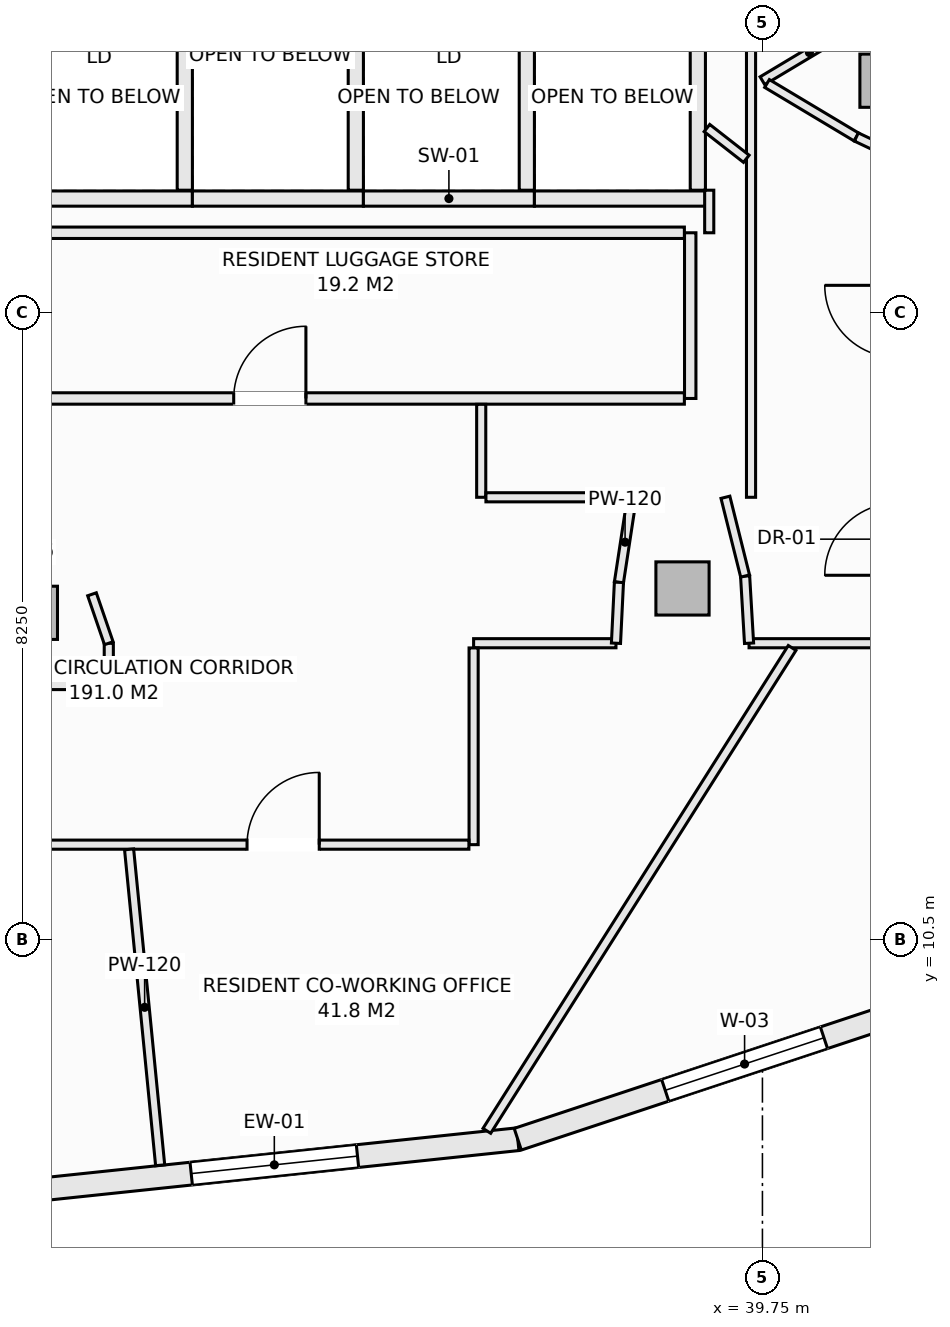
"""IFC4 building model, lengths in metres.
Left out: names, types, materials, properties, quantities, classifications, styles, units other than length and angle.
Written with IfcOpenShell. Run it as: python <this file> out.ifc"""

import sys

from ifc_helpers import new_model, si_unit, direction, frame, frame_2d, origin, origin_2d, place, context, subcontext, project, spatial, rectangle, extrude, element, fill, save


model = new_model("IFC4")
c1 = context("Model", 3, precision=1e-05, world=origin(), true_north=direction((0.0, 1.0)))
c2 = subcontext(c1, "Body", "Model", "MODEL_VIEW")
j1 = project(units=[si_unit("LENGTHUNIT", "METRE"), si_unit("PLANEANGLEUNIT", "RADIAN")], contexts=[c1])
p1 = place(None, origin())
s1 = spatial("IfcSite", under=j1, at=p1, CompositionType="ELEMENT")
p2 = place(p1, origin())
s2 = spatial("IfcBuilding", under=s1, at=p2, CompositionType="ELEMENT")
p3 = place(p2, frame((0.0, 0.0, 206.3)))
s3 = spatial("IfcBuildingStorey", under=s2, at=p3, CompositionType="ELEMENT", Elevation=206.3)
for number, where, z_axis, x_axis in (
    (1, (30.125, 14.8, -0.27), (0.0, 0.0, 1.0), (1.0, 0.0, 0.0)),
    (2, (38.698, 15.121, -0.27), (0.0, 0.0, 1.0), (1.0, 0.0, 0.0)),
    (3, (41.382, 21.801, -0.27), (0.0, 0.0, 1.0), (1.0, 0.0, 0.0)),
):
    element("IfcColumn", number, at=place(p3, frame(where, z_axis=z_axis, x_axis=x_axis)), inside=s3, PredefinedType="COLUMN", context=c2, shape_type="SweptSolid", body=[
        extrude(rectangle(XDim=0.7, YDim=0.7, at=origin_2d()), origin(), (0.0, 0.0, 1.0), 3.3),
    ])
p4 = place(p3, frame((30.125, 7.2, 0.0), z_axis=(0.0, 0.0, 1.0), x_axis=(0.994497142298, 0.104763705363, 0.0)))
e4 = element("IfcWall", 4, at=p4, inside=s3, PredefinedType="SOLIDWALL", context=c2, shape_type="SweptSolid", body=[
    extrude(rectangle(XDim=6.441, YDim=0.3, at=frame_2d((3.221, 0.0))), origin(), (0.0, 0.0, 1.0), 2.605),
])
p5 = place(p4, frame((2.121, 0.0, 0.72)))
e5 = element("IfcOpeningElement", 5, at=p5, cuts=e4, PredefinedType="OPENING", context=c2, shape_type="SweptSolid", body=[
    extrude(rectangle(XDim=2.2, YDim=1.65, at=frame_2d((1.1, 0.825))), frame((0.0, 0.16, 0.0), z_axis=(0.0, -1.0, 0.0), x_axis=(1.0, 0.0, 0.0)), (0.0, 0.0, 1.0), 0.32),
])
p6 = place(p3, frame((36.531, 7.875, 0.0), z_axis=(0.0, 0.0, 1.0), x_axis=(0.949240877604, 0.314550085495, 0.0)))
e6 = element("IfcWall", 6, at=p6, inside=s3, PredefinedType="SOLIDWALL", context=c2, shape_type="SweptSolid", body=[
    extrude(rectangle(XDim=6.288, YDim=0.3, at=frame_2d((3.144, 0.0))), origin(), (0.0, 0.0, 1.0), 2.605),
])
p7 = place(p6, frame((2.044, 0.0, 0.72)))
e7 = element("IfcOpeningElement", 7, at=p7, cuts=e6, PredefinedType="OPENING", context=c2, shape_type="SweptSolid", body=[
    extrude(rectangle(XDim=2.2, YDim=1.65, at=frame_2d((1.1, 0.825))), frame((0.0, 0.16, 0.0), z_axis=(0.0, -1.0, 0.0), x_axis=(1.0, 0.0, 0.0)), (0.0, 0.0, 1.0), 0.32),
])
p8 = place(p3, frame((29.8, 20.25, 0.0), z_axis=(0.0, 0.0, 1.0), x_axis=(1.0, 0.0, 0.0)))
e8 = element("IfcWall", 8, at=p8, inside=s3, PredefinedType="SOLIDWALL", context=c2, shape_type="SweptSolid", body=[
    extrude(rectangle(XDim=2.45, YDim=0.2, at=frame_2d((1.225, 0.0))), origin(), (0.0, 0.0, 1.0), 3.03),
])
p9 = place(p3, frame((32.15, 20.36, 0.0), z_axis=(0.0, 0.0, 1.0), x_axis=(0.0, 1.0, 0.0)))
e9 = element("IfcWall", 9, at=p9, inside=s3, PredefinedType="SOLIDWALL", context=c2, shape_type="SweptSolid", body=[
    extrude(rectangle(XDim=2.43, YDim=0.2, at=frame_2d((1.215, 0.0))), origin(), (0.0, 0.0, 1.0), 3.03),
])
p10 = place(p3, frame((32.25, 20.25, 0.0), z_axis=(0.0, 0.0, 1.0), x_axis=(1.0, 0.0, 0.0)))
e10 = element("IfcWall", 10, at=p10, inside=s3, PredefinedType="SOLIDWALL", context=c2, shape_type="SweptSolid", body=[
    extrude(rectangle(XDim=2.25, YDim=0.2, at=frame_2d((1.125, 0.0))), origin(), (0.0, 0.0, 1.0), 3.03),
])
p11 = place(p3, frame((34.4, 20.36, 0.0), z_axis=(0.0, 0.0, 1.0), x_axis=(0.0, 1.0, 0.0)))
e11 = element("IfcWall", 11, at=p11, inside=s3, PredefinedType="SOLIDWALL", context=c2, shape_type="SweptSolid", body=[
    extrude(rectangle(XDim=2.43, YDim=0.2, at=frame_2d((1.215, 0.0))), origin(), (0.0, 0.0, 1.0), 3.03),
])
p12 = place(p3, frame((34.5, 20.25, 0.0), z_axis=(0.0, 0.0, 1.0), x_axis=(1.0, 0.0, 0.0)))
e12 = element("IfcWall", 12, at=p12, inside=s3, PredefinedType="SOLIDWALL", context=c2, shape_type="SweptSolid", body=[
    extrude(rectangle(XDim=2.25, YDim=0.2, at=frame_2d((1.125, 0.0))), origin(), (0.0, 0.0, 1.0), 3.03),
])
p13 = place(p3, frame((36.65, 20.36, 0.0), z_axis=(0.0, 0.0, 1.0), x_axis=(0.0, 1.0, 0.0)))
e13 = element("IfcWall", 13, at=p13, inside=s3, PredefinedType="SOLIDWALL", context=c2, shape_type="SweptSolid", body=[
    extrude(rectangle(XDim=2.43, YDim=0.2, at=frame_2d((1.215, 0.0))), origin(), (0.0, 0.0, 1.0), 3.03),
])
p14 = place(p3, frame((36.75, 20.25, 0.0), z_axis=(0.0, 0.0, 1.0), x_axis=(1.0, 0.0, 0.0)))
e14 = element("IfcWall", 14, at=p14, inside=s3, PredefinedType="SOLIDWALL", context=c2, shape_type="SweptSolid", body=[
    extrude(rectangle(XDim=2.25, YDim=0.2, at=frame_2d((1.125, 0.0))), origin(), (0.0, 0.0, 1.0), 3.03),
])
p15 = place(p3, frame((38.9, 20.36, 0.0), z_axis=(0.0, 0.0, 1.0), x_axis=(0.0, 1.0, 0.0)))
e15 = element("IfcWall", 15, at=p15, inside=s3, PredefinedType="SOLIDWALL", context=c2, shape_type="SweptSolid", body=[
    extrude(rectangle(XDim=2.43, YDim=0.2, at=frame_2d((1.215, 0.0))), origin(), (0.0, 0.0, 1.0), 3.03),
])
p16 = place(p3, frame((38.8, 17.62, 0.0), z_axis=(0.0, 0.0, 1.0), x_axis=(0.0, 1.0, 0.0)))
e16 = element("IfcWall", 16, at=p16, inside=s3, PredefinedType="PARTITIONING", context=c2, shape_type="SweptSolid", body=[
    extrude(rectangle(XDim=2.18, YDim=0.15, at=frame_2d((1.09, 0.0))), origin(), (0.0, 0.0, 1.0), 3.03),
])
p17 = place(p3, frame((30.077, 17.62, 0.0), z_axis=(0.0, 0.0, 1.0), x_axis=(1.0, 0.0, 0.0)))
e17 = element("IfcWall", 17, at=p17, inside=s3, PredefinedType="PARTITIONING", context=c2, shape_type="SweptSolid", body=[
    extrude(rectangle(XDim=8.646, YDim=0.15, at=frame_2d((4.323, 0.0))), origin(), (0.0, 0.0, 1.0), 3.03),
])
p18 = place(p17, frame((2.717, 0.0, 0.0)))
e18 = element("IfcOpeningElement", 18, at=p18, cuts=e17, PredefinedType="OPENING", context=c2, shape_type="SweptSolid", body=[
    extrude(rectangle(XDim=0.95, YDim=2.1, at=frame_2d((0.475, 1.05))), frame((0.0, 0.085, 0.0), z_axis=(0.0, -1.0, 0.0), x_axis=(1.0, 0.0, 0.0)), (0.0, 0.0, 1.0), 0.17),
])
p19 = place(p3, frame((30.077, 19.8, 0.0), z_axis=(0.0, 0.0, 1.0), x_axis=(1.0, 0.0, 0.0)))
e19 = element("IfcWall", 19, at=p19, inside=s3, PredefinedType="PARTITIONING", context=c2, shape_type="SweptSolid", body=[
    extrude(rectangle(XDim=8.646, YDim=0.15, at=frame_2d((4.323, 0.0))), origin(), (0.0, 0.0, 1.0), 3.03),
])
p20 = place(p3, frame((39.05, 19.8, 0.0), z_axis=(0.0, 0.0, 1.0), x_axis=(0.0, 1.0, 0.0)))
e20 = element("IfcWall", 20, at=p20, inside=s3, PredefinedType="PARTITIONING", context=c2, shape_type="SweptSolid", body=[
    extrude(rectangle(XDim=0.56, YDim=0.12, at=frame_2d((0.28, 0.0))), origin(), (0.0, 0.0, 1.0), 3.03),
])
p21 = place(p3, frame((39.6, 16.32, 0.0), z_axis=(0.0, 0.0, 1.0), x_axis=(0.0, 1.0, 0.0)))
e21 = element("IfcWall", 21, at=p21, inside=s3, PredefinedType="PARTITIONING", context=c2, shape_type="SweptSolid", body=[
    extrude(rectangle(XDim=6.7, YDim=0.12, at=frame_2d((3.35, 0.0))), origin(), (0.0, 0.0, 1.0), 2.478),
])
p22 = place(p3, frame((39.75, 21.8, 0.0), z_axis=(0.0, 0.0, 1.0), x_axis=(0.857702120906, 0.514146935996, 0.0)))
e22 = element("IfcWall", 22, at=p22, inside=s3, PredefinedType="PARTITIONING", context=c2, shape_type="SweptSolid", body=[
    extrude(rectangle(XDim=1.441, YDim=0.12, at=frame_2d((0.721, 0.0))), origin(), (0.0, 0.0, 1.0), 3.03),
])
p23 = place(p3, frame((39.81, 21.764, 0.0), z_axis=(0.0, 0.0, 1.0), x_axis=(0.858011245414, -0.513630901273, 0.0)))
e23 = element("IfcWall", 23, at=p23, inside=s3, PredefinedType="PARTITIONING", context=c2, shape_type="SweptSolid", body=[
    extrude(rectangle(XDim=1.37, YDim=0.12, at=frame_2d((0.685, 0.0))), origin(), (0.0, 0.0, 1.0), 3.03),
])
p24 = place(p3, frame((40.986, 21.06, 0.0), z_axis=(0.0, 0.0, 1.0), x_axis=(0.90356951601, -0.428441512621, 0.0)))
e24 = element("IfcWall", 24, at=p24, inside=s3, PredefinedType="PARTITIONING", context=c2, shape_type="SweptSolid", body=[
    extrude(rectangle(XDim=0.591, YDim=0.12, at=frame_2d((0.295, 0.0))), origin(), (0.0, 0.0, 1.0), 3.03),
])
p25 = place(p3, frame((35.95, 14.4, 0.0), z_axis=(0.0, 0.0, 1.0), x_axis=(1.0, 0.0, 0.0)))
e25 = element("IfcWall", 25, at=p25, inside=s3, PredefinedType="PARTITIONING", context=c2, shape_type="SweptSolid", body=[
    extrude(rectangle(XDim=1.873, YDim=0.12, at=frame_2d((0.937, 0.0))), origin(), (0.0, 0.0, 1.0), 3.03),
])
p26 = place(p3, frame((39.574, 14.4, 0.0), z_axis=(0.0, 0.0, 1.0), x_axis=(1.0, 0.0, 0.0)))
e26 = element("IfcWall", 26, at=p26, inside=s3, PredefinedType="PARTITIONING", context=c2, shape_type="SweptSolid", body=[
    extrude(rectangle(XDim=1.884, YDim=0.12, at=frame_2d((0.942, 0.0))), origin(), (0.0, 0.0, 1.0), 3.03),
])
p27 = place(p3, frame((39.522, 15.284, 0.0), z_axis=(0.0, 0.0, 1.0), x_axis=(0.058722021951, -0.998274373175, 0.0)))
e27 = element("IfcWall", 27, at=p27, inside=s3, PredefinedType="PARTITIONING", context=c2, shape_type="SweptSolid", body=[
    extrude(rectangle(XDim=0.885, YDim=0.12, at=frame_2d((0.443, 0.0))), origin(), (0.0, 0.0, 1.0), 3.03),
])
p28 = place(p3, frame((39.263, 16.32, 0.0), z_axis=(0.0, 0.0, 1.0), x_axis=(0.242535625036, -0.970142500145, 0.0)))
e28 = element("IfcWall", 28, at=p28, inside=s3, PredefinedType="PARTITIONING", context=c2, shape_type="SweptSolid", body=[
    extrude(rectangle(XDim=1.068, YDim=0.12, at=frame_2d((0.534, 0.0))), origin(), (0.0, 0.0, 1.0), 2.478),
])
p29 = place(p3, frame((36.05, 16.32, 0.0), z_axis=(0.0, 0.0, 1.0), x_axis=(0.0, 1.0, 0.0)))
e29 = element("IfcWall", 29, at=p29, inside=s3, PredefinedType="PARTITIONING", context=c2, shape_type="SweptSolid", body=[
    extrude(rectangle(XDim=1.223, YDim=0.12, at=frame_2d((0.611, 0.0))), origin(), (0.0, 0.0, 1.0), 3.03),
])
p30 = place(p3, frame((36.112, 16.32, 0.0), z_axis=(0.0, 0.0, 1.0), x_axis=(1.0, 0.0, 0.0)))
e30 = element("IfcWall", 30, at=p30, inside=s3, PredefinedType="PARTITIONING", context=c2, shape_type="SweptSolid", body=[
    extrude(rectangle(XDim=1.921, YDim=0.12, at=frame_2d((0.96, 0.0))), origin(), (0.0, 0.0, 1.0), 3.03),
])
p31 = place(p3, frame((37.862, 15.201, 0.0), z_axis=(0.0, 0.0, 1.0), x_axis=(0.150907653202, 0.988547864398, 0.0)))
e31 = element("IfcWall", 31, at=p31, inside=s3, PredefinedType="PARTITIONING", context=c2, shape_type="SweptSolid", body=[
    extrude(rectangle(XDim=1.069, YDim=0.12, at=frame_2d((0.535, 0.0))), origin(), (0.0, 0.0, 1.0), 3.03),
])
p32 = place(p3, frame((37.823, 14.4, 0.0), z_axis=(0.0, 0.0, 1.0), x_axis=(0.04870773904, 0.998813073682, 0.0)))
e32 = element("IfcWall", 32, at=p32, inside=s3, PredefinedType="PARTITIONING", context=c2, shape_type="SweptSolid", body=[
    extrude(rectangle(XDim=0.802, YDim=0.12, at=frame_2d((0.401, 0.0))), origin(), (0.0, 0.0, 1.0), 3.03),
])
p33 = place(p3, frame((35.95, 11.75, 0.0), z_axis=(0.0, 0.0, 1.0), x_axis=(0.0, 1.0, 0.0)))
e33 = element("IfcWall", 33, at=p33, inside=s3, PredefinedType="PARTITIONING", context=c2, shape_type="SweptSolid", body=[
    extrude(rectangle(XDim=2.588, YDim=0.12, at=frame_2d((1.294, 0.0))), origin(), (0.0, 0.0, 1.0), 3.03),
])
p34 = place(p3, frame((27.212, 11.75, 0.0), z_axis=(0.0, 0.0, 1.0), x_axis=(1.0, 0.0, 0.0)))
e34 = element("IfcWall", 34, at=p34, inside=s3, PredefinedType="PARTITIONING", context=c2, shape_type="SweptSolid", body=[
    extrude(rectangle(XDim=8.676, YDim=0.12, at=frame_2d((4.338, 0.0))), origin(), (0.0, 0.0, 1.0), 3.03),
])
p35 = place(p34, frame((1.83, 0.0, 0.0)))
e35 = element("IfcOpeningElement", 35, at=p35, cuts=e34, PredefinedType="OPENING", context=c2, shape_type="SweptSolid", body=[
    extrude(rectangle(XDim=0.95, YDim=2.1, at=frame_2d((0.475, 1.05))), frame((0.0, 0.07, 0.0), z_axis=(0.0, -1.0, 0.0), x_axis=(1.0, 0.0, 0.0)), (0.0, 0.0, 1.0), 0.14),
])
p36 = place(p34, frame((5.757, 0.0, 0.0)))
e36 = element("IfcOpeningElement", 36, at=p36, cuts=e34, PredefinedType="OPENING", context=c2, shape_type="SweptSolid", body=[
    extrude(rectangle(XDim=0.95, YDim=2.1, at=frame_2d((0.475, 1.05))), frame((0.0, 0.07, 0.0), z_axis=(0.0, -1.0, 0.0), x_axis=(1.0, 0.0, 0.0)), (0.0, 0.0, 1.0), 0.14),
])
p37 = place(p3, frame((29.96, 13.85, 0.0), z_axis=(0.0, 0.0, 1.0), x_axis=(1.0, 0.0, 0.0)))
e37 = element("IfcWall", 37, at=p37, inside=s3, PredefinedType="PARTITIONING", context=c2, shape_type="SweptSolid", body=[
    extrude(rectangle(XDim=1.19, YDim=0.12, at=frame_2d((0.595, 0.0))), origin(), (0.0, 0.0, 1.0), 3.03),
])
p38 = place(p3, frame((31.15, 13.912, 0.0), z_axis=(0.0, 0.0, 1.0), x_axis=(0.0, 1.0, 0.0)))
e38 = element("IfcWall", 38, at=p38, inside=s3, PredefinedType="PARTITIONING", context=c2, shape_type="SweptSolid", body=[
    extrude(rectangle(XDim=0.488, YDim=0.12, at=frame_2d((0.244, 0.0))), origin(), (0.0, 0.0, 1.0), 3.03),
])
p39 = place(p3, frame((30.929, 15.044, 0.0), z_axis=(0.0, 0.0, 1.0), x_axis=(0.324498492416, -0.945886213252, 0.0)))
e39 = element("IfcWall", 39, at=p39, inside=s3, PredefinedType="PARTITIONING", context=c2, shape_type="SweptSolid", body=[
    extrude(rectangle(XDim=0.681, YDim=0.12, at=frame_2d((0.34, 0.0))), origin(), (0.0, 0.0, 1.0), 3.03),
])
p40 = place(p3, frame((31.417, 11.688, 0.0), z_axis=(0.0, 0.0, 1.0), x_axis=(0.097923390467, -0.995193955769, 0.0)))
e40 = element("IfcWall", 40, at=p40, inside=s3, PredefinedType="PARTITIONING", context=c2, shape_type="SweptSolid", body=[
    extrude(rectangle(XDim=4.176, YDim=0.12, at=frame_2d((2.088, 0.0))), origin(), (0.0, 0.0, 1.0), 3.03),
])
p41 = place(p3, frame((39.02, 21.178, 0.0), z_axis=(0.0, 0.0, 1.0), x_axis=(0.788170760396, -0.615456621101, 0.0)))
e41 = element("IfcWall", 41, at=p41, inside=s3, PredefinedType="PARTITIONING", context=c2, shape_type="SweptSolid", body=[
    extrude(rectangle(XDim=0.657, YDim=0.12, at=frame_2d((0.329, 0.0))), origin(), (0.0, 0.0, 1.0), 3.03),
])
p42 = place(p3, frame((36.124, 7.985, 0.0), z_axis=(0.0, 0.0, 1.0), x_axis=(0.534397421847, 0.845233337915, 0.0)))
e42 = element("IfcWall", 42, at=p42, inside=s3, PredefinedType="PARTITIONING", context=c2, shape_type="SweptSolid", body=[
    extrude(rectangle(XDim=7.517, YDim=0.12, at=frame_2d((3.758, 0.0))), origin(), (0.0, 0.0, 1.0), 3.03),
])
p43 = place(p5, origin())
e43 = element("IfcWindow", 43, at=p43, inside=s3, PartitioningType="SINGLE_PANEL", PredefinedType="WINDOW", context=c2, shape_type="SweptSolid", body=[
    extrude(rectangle(XDim=2.2, YDim=1.65, at=frame_2d((1.1, 0.825))), frame((0.0, 0.03, 0.0), z_axis=(0.0, -1.0, 0.0), x_axis=(1.0, 0.0, 0.0)), (0.0, 0.0, 1.0), 0.06),
])
fill(e5, e43)
p44 = place(p7, origin())
e44 = element("IfcWindow", 44, at=p44, inside=s3, PartitioningType="SINGLE_PANEL", PredefinedType="WINDOW", context=c2, shape_type="SweptSolid", body=[
    extrude(rectangle(XDim=2.2, YDim=1.65, at=frame_2d((1.1, 0.825))), frame((0.0, 0.03, 0.0), z_axis=(0.0, -1.0, 0.0), x_axis=(1.0, 0.0, 0.0)), (0.0, 0.0, 1.0), 0.06),
])
fill(e7, e44)
p45 = place(p18, origin())
e45 = element("IfcDoor", 45, at=p45, inside=s3, OperationType="SINGLE_SWING_RIGHT", PredefinedType="DOOR", context=c2, shape_type="SweptSolid", body=[
    extrude(rectangle(XDim=0.95, YDim=2.1, at=frame_2d((0.475, 1.05))), frame((0.0, 0.025, 0.0), z_axis=(0.0, -1.0, 0.0), x_axis=(1.0, 0.0, 0.0)), (0.0, 0.0, 1.0), 0.05),
])
fill(e18, e45)
p46 = place(p36, origin())
e46 = element("IfcDoor", 46, at=p46, inside=s3, OperationType="SINGLE_SWING_RIGHT", PredefinedType="DOOR", context=c2, shape_type="SweptSolid", body=[
    extrude(rectangle(XDim=0.95, YDim=2.1, at=frame_2d((0.475, 1.05))), frame((0.0, 0.025, 0.0), z_axis=(0.0, -1.0, 0.0), x_axis=(1.0, 0.0, 0.0)), (0.0, 0.0, 1.0), 0.05),
])
fill(e36, e46)
save(model, sys.argv[1])
